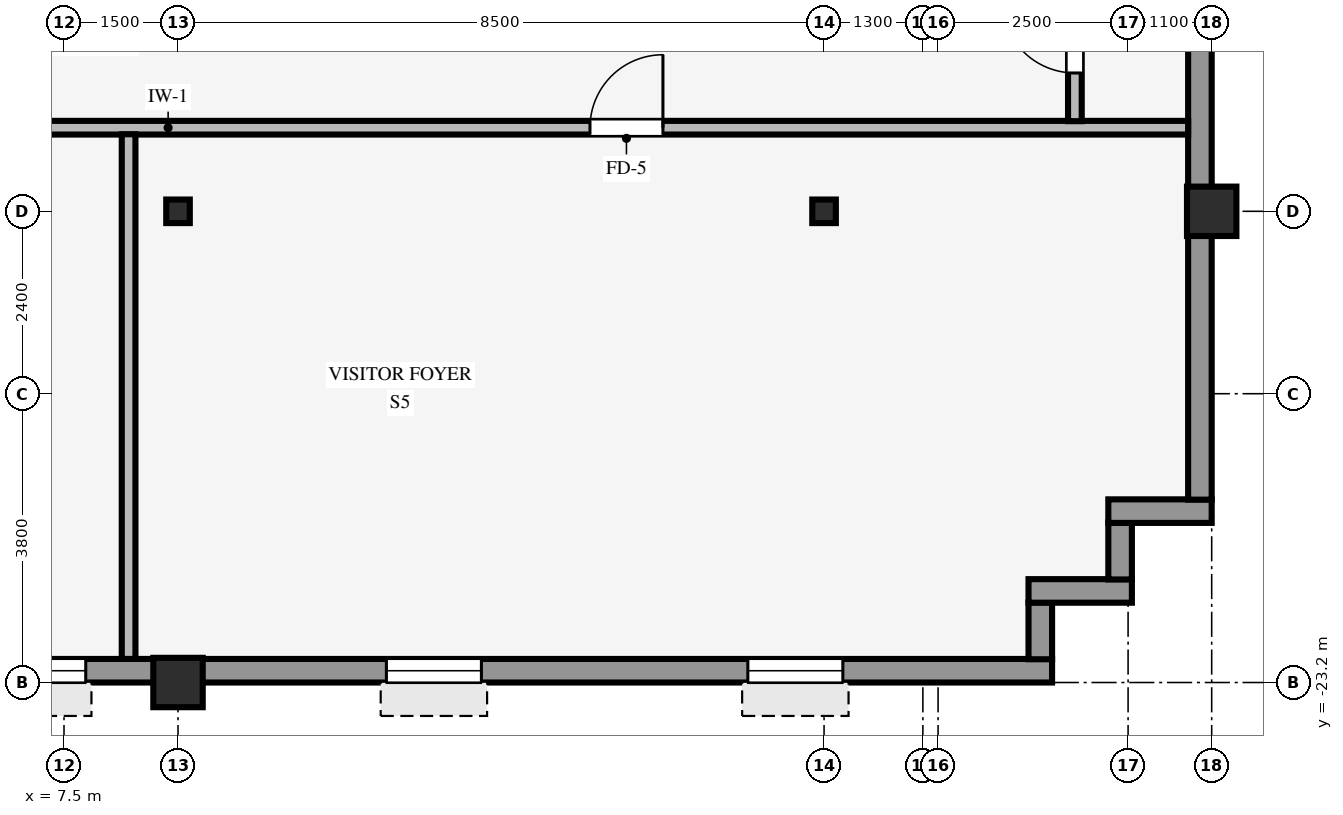
"""IFC4 building model, lengths in metres.
Left out: names, types, materials, properties, quantities, classifications, styles, units other than length and angle.
Written with IfcOpenShell. Run it as: python <this file> out.ifc"""

import sys

from ifc_helpers import new_model, si_unit, direction, frame, frame_2d, origin, origin_2d, place, context, subcontext, project, spatial, rectangle, hollow_rectangle, i_section, extrude, source, transform, mapped, element, fill, save


model = new_model("IFC4")
c1 = context("Model", 3, precision=1e-05, world=origin(), true_north=direction((0.0, 1.0)))
c2 = subcontext(c1, "Body", "Model", "MODEL_VIEW")
j1 = project(units=[si_unit("LENGTHUNIT", "METRE"), si_unit("PLANEANGLEUNIT", "RADIAN")], contexts=[c1])
p1 = place(None, origin())
s1 = spatial("IfcSite", under=j1, at=p1, CompositionType="ELEMENT")
p2 = place(p1, origin())
s2 = spatial("IfcBuilding", under=s1, at=p2, CompositionType="ELEMENT")
p3 = place(p2, frame((0.0, 0.0, 178.6)))
s3 = spatial("IfcBuildingStorey", under=s2, at=p3, CompositionType="ELEMENT", Elevation=178.6)
for number, where, z_axis, x_axis in (
    (1, (22.6, -17.0, 0.0), (0.0, 0.0, 1.0), (1.0, 0.0, 0.0)),
    (2, (9.0, -23.2, 0.0), (0.0, 0.0, 1.0), (1.0, 0.0, 0.0)),
):
    element("IfcColumn", number, at=place(p3, frame(where, z_axis=z_axis, x_axis=x_axis)), inside=s3, PredefinedType="COLUMN", context=c2, shape_type="SweptSolid", body=[
        extrude(hollow_rectangle(XDim=0.65, YDim=0.65, WallThickness=0.04, InnerFilletRadius=0.04, OuterFilletRadius=0.08, at=origin_2d()), origin(), (0.0, 0.0, 1.0), 3.37),
    ])
for number, where, z_axis, x_axis in (
    (3, (9.0, -17.0, 0.0), (0.0, 0.0, 1.0), (1.0, 0.0, 0.0)),
    (4, (17.5, -17.0, 0.0), (0.0, 0.0, 1.0), (1.0, 0.0, 0.0)),
):
    element("IfcColumn", number, at=place(p3, frame(where, z_axis=z_axis, x_axis=x_axis)), inside=s3, PredefinedType="COLUMN", context=c2, shape_type="SweptSolid", body=[
        extrude(i_section(OverallWidth=0.31, OverallDepth=0.31, WebThickness=0.015, FlangeThickness=0.015, FilletRadius=0.015, at=origin_2d()), origin(), (0.0, 0.0, 1.0), 3.37),
    ])
p4 = place(p3, frame((-24.3, -23.045, 0.0), z_axis=(0.0, 0.0, 1.0), x_axis=(1.0, 0.0, 0.0)))
e5 = element("IfcWall", 5, at=p4, inside=s3, PredefinedType="STANDARD", context=c2, shape_type="SweptSolid", body=[
    extrude(rectangle(XDim=44.8, YDim=0.31, at=frame_2d((22.4, 0.0))), origin(), (0.0, 0.0, 1.0), 2.705),
])
p5 = place(p4, frame((2.753, 0.0, 0.8)))
e6 = element("IfcOpeningElement", 6, at=p5, cuts=e5, PredefinedType="OPENING", context=c2, shape_type="SweptSolid", body=[
    extrude(rectangle(XDim=1.25, YDim=1.52, at=frame_2d((0.625, 0.76))), frame((0.0, 0.165, 0.0), z_axis=(0.0, -1.0, 0.0), x_axis=(1.0, 0.0, 0.0)), (0.0, 0.0, 1.0), 0.33),
])
p6 = place(p4, frame((7.508, 0.0, 0.8)))
e7 = element("IfcOpeningElement", 7, at=p6, cuts=e5, PredefinedType="OPENING", context=c2, shape_type="SweptSolid", body=[
    extrude(rectangle(XDim=1.25, YDim=1.52, at=frame_2d((0.625, 0.76))), frame((0.0, 0.165, 0.0), z_axis=(0.0, -1.0, 0.0), x_axis=(1.0, 0.0, 0.0)), (0.0, 0.0, 1.0), 0.33),
])
p7 = place(p4, frame((12.264, 0.0, 0.8)))
e8 = element("IfcOpeningElement", 8, at=p7, cuts=e5, PredefinedType="OPENING", context=c2, shape_type="SweptSolid", body=[
    extrude(rectangle(XDim=1.25, YDim=1.52, at=frame_2d((0.625, 0.76))), frame((0.0, 0.165, 0.0), z_axis=(0.0, -1.0, 0.0), x_axis=(1.0, 0.0, 0.0)), (0.0, 0.0, 1.0), 0.33),
])
p8 = place(p4, frame((17.019, 0.0, 0.8)))
e9 = element("IfcOpeningElement", 9, at=p8, cuts=e5, PredefinedType="OPENING", context=c2, shape_type="SweptSolid", body=[
    extrude(rectangle(XDim=1.25, YDim=1.52, at=frame_2d((0.625, 0.76))), frame((0.0, 0.165, 0.0), z_axis=(0.0, -1.0, 0.0), x_axis=(1.0, 0.0, 0.0)), (0.0, 0.0, 1.0), 0.33),
])
p9 = place(p4, frame((21.775, 0.0, 0.8)))
e10 = element("IfcOpeningElement", 10, at=p9, cuts=e5, PredefinedType="OPENING", context=c2, shape_type="SweptSolid", body=[
    extrude(rectangle(XDim=1.25, YDim=1.52, at=frame_2d((0.625, 0.76))), frame((0.0, 0.165, 0.0), z_axis=(0.0, -1.0, 0.0), x_axis=(1.0, 0.0, 0.0)), (0.0, 0.0, 1.0), 0.33),
])
p10 = place(p4, frame((26.531, 0.0, 0.8)))
e11 = element("IfcOpeningElement", 11, at=p10, cuts=e5, PredefinedType="OPENING", context=c2, shape_type="SweptSolid", body=[
    extrude(rectangle(XDim=1.25, YDim=1.52, at=frame_2d((0.625, 0.76))), frame((0.0, 0.165, 0.0), z_axis=(0.0, -1.0, 0.0), x_axis=(1.0, 0.0, 0.0)), (0.0, 0.0, 1.0), 0.33),
])
p11 = place(p4, frame((30.836, 0.0, 0.8)))
e12 = element("IfcOpeningElement", 12, at=p11, cuts=e5, PredefinedType="OPENING", context=c2, shape_type="SweptSolid", body=[
    extrude(rectangle(XDim=1.25, YDim=1.52, at=frame_2d((0.625, 0.76))), frame((0.0, 0.165, 0.0), z_axis=(0.0, -1.0, 0.0), x_axis=(1.0, 0.0, 0.0)), (0.0, 0.0, 1.0), 0.33),
])
p12 = place(p4, frame((36.042, 0.0, 0.8)))
e13 = element("IfcOpeningElement", 13, at=p12, cuts=e5, PredefinedType="OPENING", context=c2, shape_type="SweptSolid", body=[
    extrude(rectangle(XDim=1.25, YDim=1.52, at=frame_2d((0.625, 0.76))), frame((0.0, 0.165, 0.0), z_axis=(0.0, -1.0, 0.0), x_axis=(1.0, 0.0, 0.0)), (0.0, 0.0, 1.0), 0.33),
])
p13 = place(p4, frame((40.797, 0.0, 0.8)))
e14 = element("IfcOpeningElement", 14, at=p13, cuts=e5, PredefinedType="OPENING", context=c2, shape_type="SweptSolid", body=[
    extrude(rectangle(XDim=1.25, YDim=1.52, at=frame_2d((0.625, 0.76))), frame((0.0, 0.165, 0.0), z_axis=(0.0, -1.0, 0.0), x_axis=(1.0, 0.0, 0.0)), (0.0, 0.0, 1.0), 0.33),
])
p14 = place(p3, frame((20.345, -22.894, 0.0), z_axis=(0.0, 0.0, 1.0), x_axis=(0.0, 1.0, 0.0)))
e15 = element("IfcWall", 15, at=p14, inside=s3, PredefinedType="STANDARD", context=c2, shape_type="SweptSolid", body=[
    extrude(rectangle(XDim=0.748, YDim=0.31, at=frame_2d((0.374, 0.0))), origin(), (0.0, 0.0, 1.0), 3.36),
])
p15 = place(p3, frame((20.19, -21.995, 0.0), z_axis=(0.0, 0.0, 1.0), x_axis=(1.0, 0.0, 0.0)))
e16 = element("IfcWall", 16, at=p15, inside=s3, PredefinedType="STANDARD", context=c2, shape_type="SweptSolid", body=[
    extrude(rectangle(XDim=1.36, YDim=0.31, at=frame_2d((0.68, 0.0))), origin(), (0.0, 0.0, 1.0), 3.36),
])
p16 = place(p3, frame((21.395, -21.844, 0.0), z_axis=(0.0, 0.0, 1.0), x_axis=(0.0, 1.0, 0.0)))
e17 = element("IfcWall", 17, at=p16, inside=s3, PredefinedType="STANDARD", context=c2, shape_type="SweptSolid", body=[
    extrude(rectangle(XDim=0.748, YDim=0.31, at=frame_2d((0.374, 0.0))), origin(), (0.0, 0.0, 1.0), 3.36),
])
p17 = place(p3, frame((21.24, -20.945, 0.0), z_axis=(0.0, 0.0, 1.0), x_axis=(1.0, 0.0, 0.0)))
e18 = element("IfcWall", 18, at=p17, inside=s3, PredefinedType="STANDARD", context=c2, shape_type="SweptSolid", body=[
    extrude(rectangle(XDim=1.36, YDim=0.31, at=frame_2d((0.68, 0.0))), origin(), (0.0, 0.0, 1.0), 3.36),
])
p18 = place(p3, frame((22.445, -20.794, 0.0), z_axis=(0.0, 0.0, 1.0), x_axis=(0.0, 1.0, 0.0)))
e19 = element("IfcWall", 19, at=p18, inside=s3, PredefinedType="STANDARD", context=c2, shape_type="SweptSolid", body=[
    extrude(rectangle(XDim=37.788, YDim=0.31, at=frame_2d((18.894, 0.0))), origin(), (0.0, 0.0, 1.0), 2.705),
])
p19 = place(p18, frame((16.444, 0.0, 0.0), z_axis=(0.0, 0.0, 1.0), x_axis=(-1.0, 0.0, 0.0)))
e20 = element("IfcOpeningElement", 20, at=p19, cuts=e19, PredefinedType="OPENING", context=c2, shape_type="SweptSolid", body=[
    extrude(rectangle(XDim=1.05, YDim=2.1, at=frame_2d((0.525, 1.05))), frame((0.0, 0.165, 0.0), z_axis=(0.0, -1.0, 0.0), x_axis=(1.0, 0.0, 0.0)), (0.0, 0.0, 1.0), 0.33),
])
p20 = place(p18, frame((7.644, 0.0, 0.8)))
e21 = element("IfcOpeningElement", 21, at=p20, cuts=e19, PredefinedType="OPENING", context=c2, shape_type="SweptSolid", body=[
    extrude(rectangle(XDim=2.05, YDim=1.52, at=frame_2d((1.025, 0.76))), frame((0.0, 0.165, 0.0), z_axis=(0.0, -1.0, 0.0), x_axis=(1.0, 0.0, 0.0)), (0.0, 0.0, 1.0), 0.33),
])
p21 = place(p18, frame((12.756, 0.0, 0.8)))
e22 = element("IfcOpeningElement", 22, at=p21, cuts=e19, PredefinedType="OPENING", context=c2, shape_type="SweptSolid", body=[
    extrude(rectangle(XDim=2.05, YDim=1.52, at=frame_2d((1.025, 0.76))), frame((0.0, 0.165, 0.0), z_axis=(0.0, -1.0, 0.0), x_axis=(1.0, 0.0, 0.0)), (0.0, 0.0, 1.0), 0.33),
])
p22 = place(p18, frame((17.869, 0.0, 0.8)))
e23 = element("IfcOpeningElement", 23, at=p22, cuts=e19, PredefinedType="OPENING", context=c2, shape_type="SweptSolid", body=[
    extrude(rectangle(XDim=2.05, YDim=1.52, at=frame_2d((1.025, 0.76))), frame((0.0, 0.165, 0.0), z_axis=(0.0, -1.0, 0.0), x_axis=(1.0, 0.0, 0.0)), (0.0, 0.0, 1.0), 0.33),
])
p23 = place(p18, frame((22.982, 0.0, 0.8)))
e24 = element("IfcOpeningElement", 24, at=p23, cuts=e19, PredefinedType="OPENING", context=c2, shape_type="SweptSolid", body=[
    extrude(rectangle(XDim=2.05, YDim=1.52, at=frame_2d((1.025, 0.76))), frame((0.0, 0.165, 0.0), z_axis=(0.0, -1.0, 0.0), x_axis=(1.0, 0.0, 0.0)), (0.0, 0.0, 1.0), 0.33),
])
p24 = place(p18, frame((27.194, 0.0, 0.8)))
e25 = element("IfcOpeningElement", 25, at=p24, cuts=e19, PredefinedType="OPENING", context=c2, shape_type="SweptSolid", body=[
    extrude(rectangle(XDim=2.05, YDim=1.52, at=frame_2d((1.025, 0.76))), frame((0.0, 0.165, 0.0), z_axis=(0.0, -1.0, 0.0), x_axis=(1.0, 0.0, 0.0)), (0.0, 0.0, 1.0), 0.33),
])
p25 = place(p18, frame((33.207, 0.0, 0.8)))
e26 = element("IfcOpeningElement", 26, at=p25, cuts=e19, PredefinedType="OPENING", context=c2, shape_type="SweptSolid", body=[
    extrude(rectangle(XDim=2.05, YDim=1.52, at=frame_2d((1.025, 0.76))), frame((0.0, 0.165, 0.0), z_axis=(0.0, -1.0, 0.0), x_axis=(1.0, 0.0, 0.0)), (0.0, 0.0, 1.0), 0.33),
])
p26 = place(p3, frame((-26.09, -15.9, 0.0), z_axis=(0.0, 0.0, 1.0), x_axis=(1.0, 0.0, 0.0)))
e27 = element("IfcWall", 27, at=p26, inside=s3, PredefinedType="PARTITIONING", context=c2, shape_type="SweptSolid", body=[
    extrude(rectangle(XDim=48.38, YDim=0.18, at=frame_2d((24.19, 0.0))), origin(), (0.0, 0.0, 1.0), 3.36),
])
p27 = place(p26, frame((40.51, 0.0, 0.0)))
e28 = element("IfcOpeningElement", 28, at=p27, cuts=e27, PredefinedType="OPENING", context=c2, shape_type="SweptSolid", body=[
    extrude(rectangle(XDim=0.96, YDim=2.1, at=frame_2d((0.48, 1.05))), frame((0.0, 0.1, 0.0), z_axis=(0.0, -1.0, 0.0), x_axis=(1.0, 0.0, 0.0)), (0.0, 0.0, 1.0), 0.2),
])
p28 = place(p26, frame((19.995, 0.0, 0.0)))
e29 = element("IfcOpeningElement", 29, at=p28, cuts=e27, PredefinedType="OPENING", context=c2, shape_type="SweptSolid", body=[
    extrude(rectangle(XDim=0.96, YDim=2.1, at=frame_2d((0.48, 1.05))), frame((0.0, 0.1, 0.0), z_axis=(0.0, -1.0, 0.0), x_axis=(1.0, 0.0, 0.0)), (0.0, 0.0, 1.0), 0.2),
])
p29 = place(p26, frame((28.45, 0.0, 0.0)))
e30 = element("IfcOpeningElement", 30, at=p29, cuts=e27, PredefinedType="OPENING", context=c2, shape_type="SweptSolid", body=[
    extrude(rectangle(XDim=0.96, YDim=2.1, at=frame_2d((0.48, 1.05))), frame((0.0, 0.1, 0.0), z_axis=(0.0, -1.0, 0.0), x_axis=(1.0, 0.0, 0.0)), (0.0, 0.0, 1.0), 0.2),
])
p30 = place(p26, frame((11.605, 0.0, 0.0)))
e31 = element("IfcOpeningElement", 31, at=p30, cuts=e27, PredefinedType="OPENING", context=c2, shape_type="SweptSolid", body=[
    extrude(rectangle(XDim=0.96, YDim=2.1, at=frame_2d((0.48, 1.05))), frame((0.0, 0.1, 0.0), z_axis=(0.0, -1.0, 0.0), x_axis=(1.0, 0.0, 0.0)), (0.0, 0.0, 1.0), 0.2),
])
p31 = place(p26, frame((2.465, 0.0, 0.0)))
e32 = element("IfcOpeningElement", 32, at=p31, cuts=e27, PredefinedType="OPENING", context=c2, shape_type="SweptSolid", body=[
    extrude(rectangle(XDim=0.96, YDim=2.1, at=frame_2d((0.48, 1.05))), frame((0.0, 0.1, 0.0), z_axis=(0.0, -1.0, 0.0), x_axis=(1.0, 0.0, 0.0)), (0.0, 0.0, 1.0), 0.2),
])
p32 = place(p3, frame((8.35, -22.89, 0.0), z_axis=(0.0, 0.0, 1.0), x_axis=(0.0, 1.0, 0.0)))
e33 = element("IfcWall", 33, at=p32, inside=s3, PredefinedType="PARTITIONING", context=c2, shape_type="SweptSolid", body=[
    extrude(rectangle(XDim=6.904, YDim=0.18, at=frame_2d((3.452, 0.0))), origin(), (0.0, 0.0, 1.0), 3.36),
])
p33 = place(p3, frame((20.8, -15.814, 0.0), z_axis=(0.0, 0.0, 1.0), x_axis=(0.0, 1.0, 0.0)))
e34 = element("IfcWall", 34, at=p33, inside=s3, PredefinedType="PARTITIONING", context=c2, shape_type="SweptSolid", body=[
    extrude(rectangle(XDim=2.228, YDim=0.18, at=frame_2d((1.114, 0.0))), origin(), (0.0, 0.0, 1.0), 3.36),
])
p34 = place(p33, frame((0.634, 0.0, 0.0)))
e35 = element("IfcOpeningElement", 35, at=p34, cuts=e34, PredefinedType="OPENING", context=c2, shape_type="SweptSolid", body=[
    extrude(rectangle(XDim=0.96, YDim=2.1, at=frame_2d((0.48, 1.05))), frame((0.0, 0.1, 0.0), z_axis=(0.0, -1.0, 0.0), x_axis=(1.0, 0.0, 0.0)), (0.0, 0.0, 1.0), 0.2),
])
m1 = source(origin(), c2, "Body", "SweptSolid", [
    extrude(rectangle(XDim=1.25, YDim=1.52, at=frame_2d((0.625, 0.76))), frame((0.0, 0.03, 0.0), z_axis=(0.0, -1.0, 0.0), x_axis=(1.0, 0.0, 0.0)), (0.0, 0.0, 1.0), 0.06),
])
p35 = place(p11, origin())
e36 = element("IfcWindow", 36, at=p35, inside=s3, PartitioningType="SINGLE_PANEL", PredefinedType="WINDOW", context=c2, shape_type="MappedRepresentation", body=[
    mapped(m1, transform((0.0, 0.0, 0.0), scale=1.0)),
])
fill(e12, e36)
p36 = place(p12, origin())
e37 = element("IfcWindow", 37, at=p36, inside=s3, PartitioningType="SINGLE_PANEL", PredefinedType="WINDOW", context=c2, shape_type="MappedRepresentation", body=[
    mapped(m1, transform((0.0, 0.0, 0.0), scale=1.0)),
])
fill(e13, e37)
p37 = place(p13, origin())
e38 = element("IfcWindow", 38, at=p37, inside=s3, PartitioningType="SINGLE_PANEL", PredefinedType="WINDOW", context=c2, shape_type="MappedRepresentation", body=[
    mapped(m1, transform((0.0, 0.0, 0.0), scale=1.0)),
])
fill(e14, e38)
m2 = source(origin(), c2, "Body", "SweptSolid", [
    extrude(rectangle(XDim=0.96, YDim=2.1, at=frame_2d((0.48, 1.05))), frame((0.0, 0.025, 0.0), z_axis=(0.0, -1.0, 0.0), x_axis=(1.0, 0.0, 0.0)), (0.0, 0.0, 1.0), 0.05),
])
p38 = place(p27, origin())
e39 = element("IfcDoor", 39, at=p38, inside=s3, OperationType="SINGLE_SWING_RIGHT", PredefinedType="DOOR", context=c2, shape_type="MappedRepresentation", body=[
    mapped(m2, transform((0.0, 0.0, 0.0), scale=1.0)),
])
fill(e28, e39)
p39 = place(p34, origin())
e40 = element("IfcDoor", 40, at=p39, inside=s3, OperationType="SINGLE_SWING_RIGHT", PredefinedType="DOOR", context=c2, shape_type="MappedRepresentation", body=[
    mapped(m2, transform((0.0, 0.0, 0.0), scale=1.0)),
])
fill(e35, e40)
save(model, sys.argv[1])
